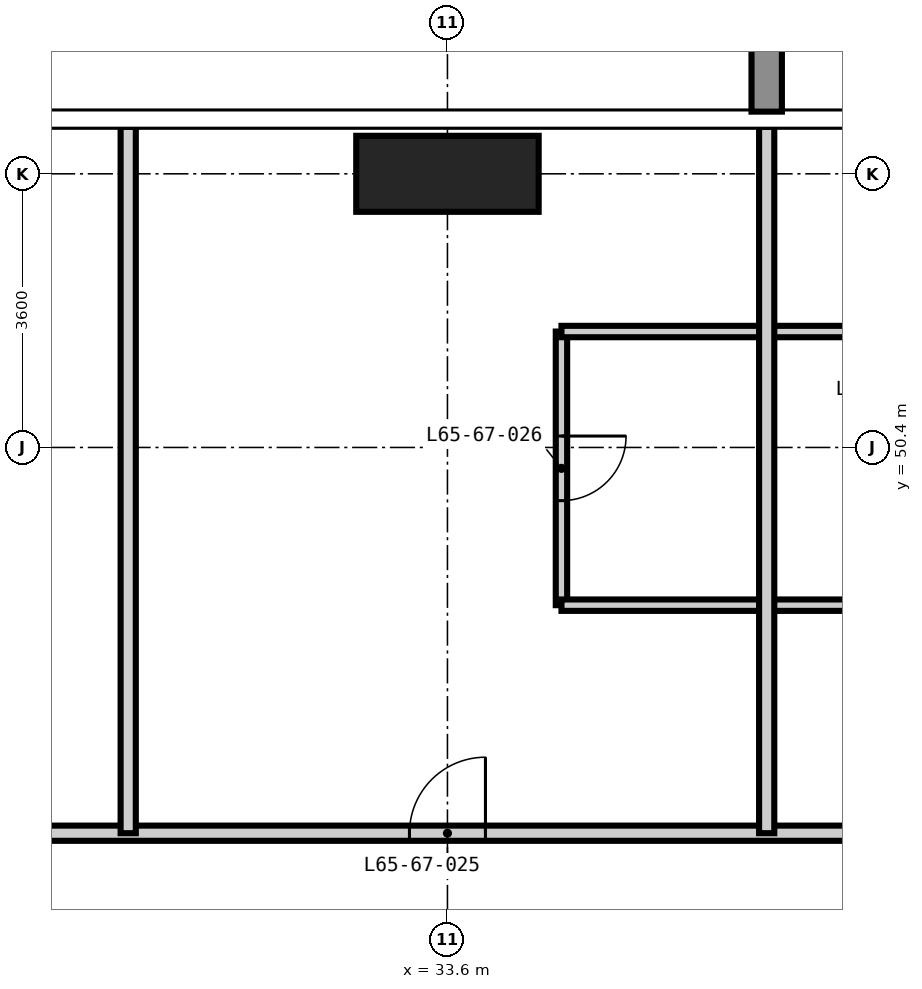
"""IFC4 building model, lengths in metres.
Left out: names, types, materials, properties, quantities, classifications, styles, units other than length and angle.
Written with IfcOpenShell. Run it as: python <this file> out.ifc"""

import sys

from ifc_helpers import new_model, si_unit, direction, frame, frame_2d, origin, origin_2d, place, context, subcontext, project, spatial, rectangle, extrude, element, fill, save


model = new_model("IFC4")
c1 = context("Model", 3, precision=1e-05, world=origin(), true_north=direction((0.0, 1.0)))
c2 = subcontext(c1, "Body", "Model", "MODEL_VIEW")
j1 = project(units=[si_unit("LENGTHUNIT", "METRE"), si_unit("PLANEANGLEUNIT", "RADIAN")], contexts=[c1])
p1 = place(None, origin())
s1 = spatial("IfcSite", under=j1, at=p1, CompositionType="ELEMENT")
p2 = place(p1, origin())
s2 = spatial("IfcBuilding", under=s1, at=p2, CompositionType="ELEMENT")
p3 = place(p2, frame((0.0, 0.0, 252.9)))
s3 = spatial("IfcBuildingStorey", under=s2, at=p3, CompositionType="ELEMENT", Elevation=252.9)
p4 = place(p3, frame((33.6, 54.0, -0.35), z_axis=(0.0, 0.0, 1.0), x_axis=(1.0, 0.0, 0.0)))
e1 = element("IfcColumn", 1, at=p4, inside=s3, PredefinedType="COLUMN", context=c2, shape_type="SweptSolid", body=[
    extrude(rectangle(XDim=2.4, YDim=1.0, at=origin_2d()), origin(), (0.0, 0.0, 1.0), 3.9),
])
p5 = place(p3, frame((35.1, 48.325, 0.0), z_axis=(0.0, 0.0, 1.0), x_axis=(0.0, 1.0, 0.0)))
e2 = element("IfcWall", 2, at=p5, inside=s3, PredefinedType="PARTITIONING", context=c2, shape_type="SweptSolid", body=[
    extrude(rectangle(XDim=3.6, YDim=0.15, at=frame_2d((1.8, 0.0))), origin(), (0.0, 0.0, 1.0), 3.55),
])
p6 = place(p5, frame((1.375, 0.0, 0.0)))
e3 = element("IfcOpeningElement", 3, at=p6, cuts=e2, PredefinedType="OPENING", context=c2, shape_type="SweptSolid", body=[
    extrude(rectangle(XDim=0.85, YDim=2.1, at=frame_2d((0.425, 1.05))), frame((0.0, 0.085, 0.0), z_axis=(0.0, -1.0, 0.0), x_axis=(1.0, 0.0, 0.0)), (0.0, 0.0, 1.0), 0.17),
])
for number, where, z_axis, x_axis in (
    (4, (35.1, 48.325, 0.0), (0.0, 0.0, 1.0), (1.0, 0.0, 0.0)),
    (5, (35.1, 51.925, 0.0), (0.0, 0.0, 1.0), (1.0, 0.0, 0.0)),
):
    element("IfcWall", number, at=place(p3, frame(where, z_axis=z_axis, x_axis=x_axis)), inside=s3, PredefinedType="PARTITIONING", context=c2, shape_type="SweptSolid", body=[
        extrude(rectangle(XDim=5.4, YDim=0.15, at=frame_2d((2.7, 0.0))), origin(), (0.0, 0.0, 1.0), 3.55),
    ])
p7 = place(p3, frame((23.075, 45.325, 0.0), z_axis=(0.0, 0.0, 1.0), x_axis=(1.0, 0.0, 0.0)))
e6 = element("IfcWall", 6, at=p7, inside=s3, PredefinedType="PARTITIONING", context=c2, shape_type="SweptSolid", body=[
    extrude(rectangle(XDim=21.65, YDim=0.2, at=frame_2d((10.825, 0.0))), origin(), (0.0, 0.0, 1.0), 3.55),
])
p8 = place(p7, frame((3.725, 0.0, 0.0)))
e7 = element("IfcOpeningElement", 7, at=p8, cuts=e6, PredefinedType="OPENING", context=c2, shape_type="SweptSolid", body=[
    extrude(rectangle(XDim=1.0, YDim=2.2, at=frame_2d((0.5, 1.1))), frame((0.0, 0.11, 0.0), z_axis=(0.0, -1.0, 0.0), x_axis=(1.0, 0.0, 0.0)), (0.0, 0.0, 1.0), 0.22),
])
p9 = place(p7, frame((10.025, 0.0, 0.0)))
e8 = element("IfcOpeningElement", 8, at=p9, cuts=e6, PredefinedType="OPENING", context=c2, shape_type="SweptSolid", body=[
    extrude(rectangle(XDim=1.0, YDim=2.2, at=frame_2d((0.5, 1.1))), frame((0.0, 0.11, 0.0), z_axis=(0.0, -1.0, 0.0), x_axis=(1.0, 0.0, 0.0)), (0.0, 0.0, 1.0), 0.22),
])
p10 = place(p7, frame((16.325, 0.0, 0.0)))
e9 = element("IfcOpeningElement", 9, at=p10, cuts=e6, PredefinedType="OPENING", context=c2, shape_type="SweptSolid", body=[
    extrude(rectangle(XDim=1.0, YDim=2.2, at=frame_2d((0.5, 1.1))), frame((0.0, 0.11, 0.0), z_axis=(0.0, -1.0, 0.0), x_axis=(1.0, 0.0, 0.0)), (0.0, 0.0, 1.0), 0.22),
])
for number, where, z_axis, x_axis in (
    (10, (29.4, 45.325, 0.0), (0.0, 0.0, 1.0), (0.0, 1.0, 0.0)),
    (11, (37.8, 45.325, 0.0), (0.0, 0.0, 1.0), (0.0, 1.0, 0.0)),
):
    element("IfcWall", number, at=place(p3, frame(where, z_axis=z_axis, x_axis=x_axis)), inside=s3, PredefinedType="PARTITIONING", context=c2, shape_type="SweptSolid", body=[
        extrude(rectangle(XDim=9.293, YDim=0.2, at=frame_2d((4.646, 0.0))), origin(), (0.0, 0.0, 1.0), 3.55),
    ])
p11 = place(p9, origin())
e12 = element("IfcDoor", 12, at=p11, inside=s3, OperationType="SINGLE_SWING_RIGHT", PredefinedType="DOOR", context=c2, shape_type="SweptSolid", body=[
    extrude(rectangle(XDim=1.0, YDim=2.2, at=frame_2d((0.5, 1.1))), frame((0.0, 0.025, 0.0), z_axis=(0.0, -1.0, 0.0), x_axis=(1.0, 0.0, 0.0)), (0.0, 0.0, 1.0), 0.05),
])
fill(e8, e12)
p12 = place(p6, frame((0.85, 0.0, 0.0), z_axis=(0.0, 0.0, 1.0), x_axis=(-1.0, 0.0, 0.0)))
e13 = element("IfcDoor", 13, at=p12, inside=s3, OperationType="SINGLE_SWING_LEFT", PredefinedType="DOOR", context=c2, shape_type="SweptSolid", body=[
    extrude(rectangle(XDim=0.85, YDim=2.1, at=frame_2d((0.425, 1.05))), frame((0.0, 0.025, 0.0), z_axis=(0.0, -1.0, 0.0), x_axis=(1.0, 0.0, 0.0)), (0.0, 0.0, 1.0), 0.05),
])
fill(e3, e13)
save(model, sys.argv[1])
